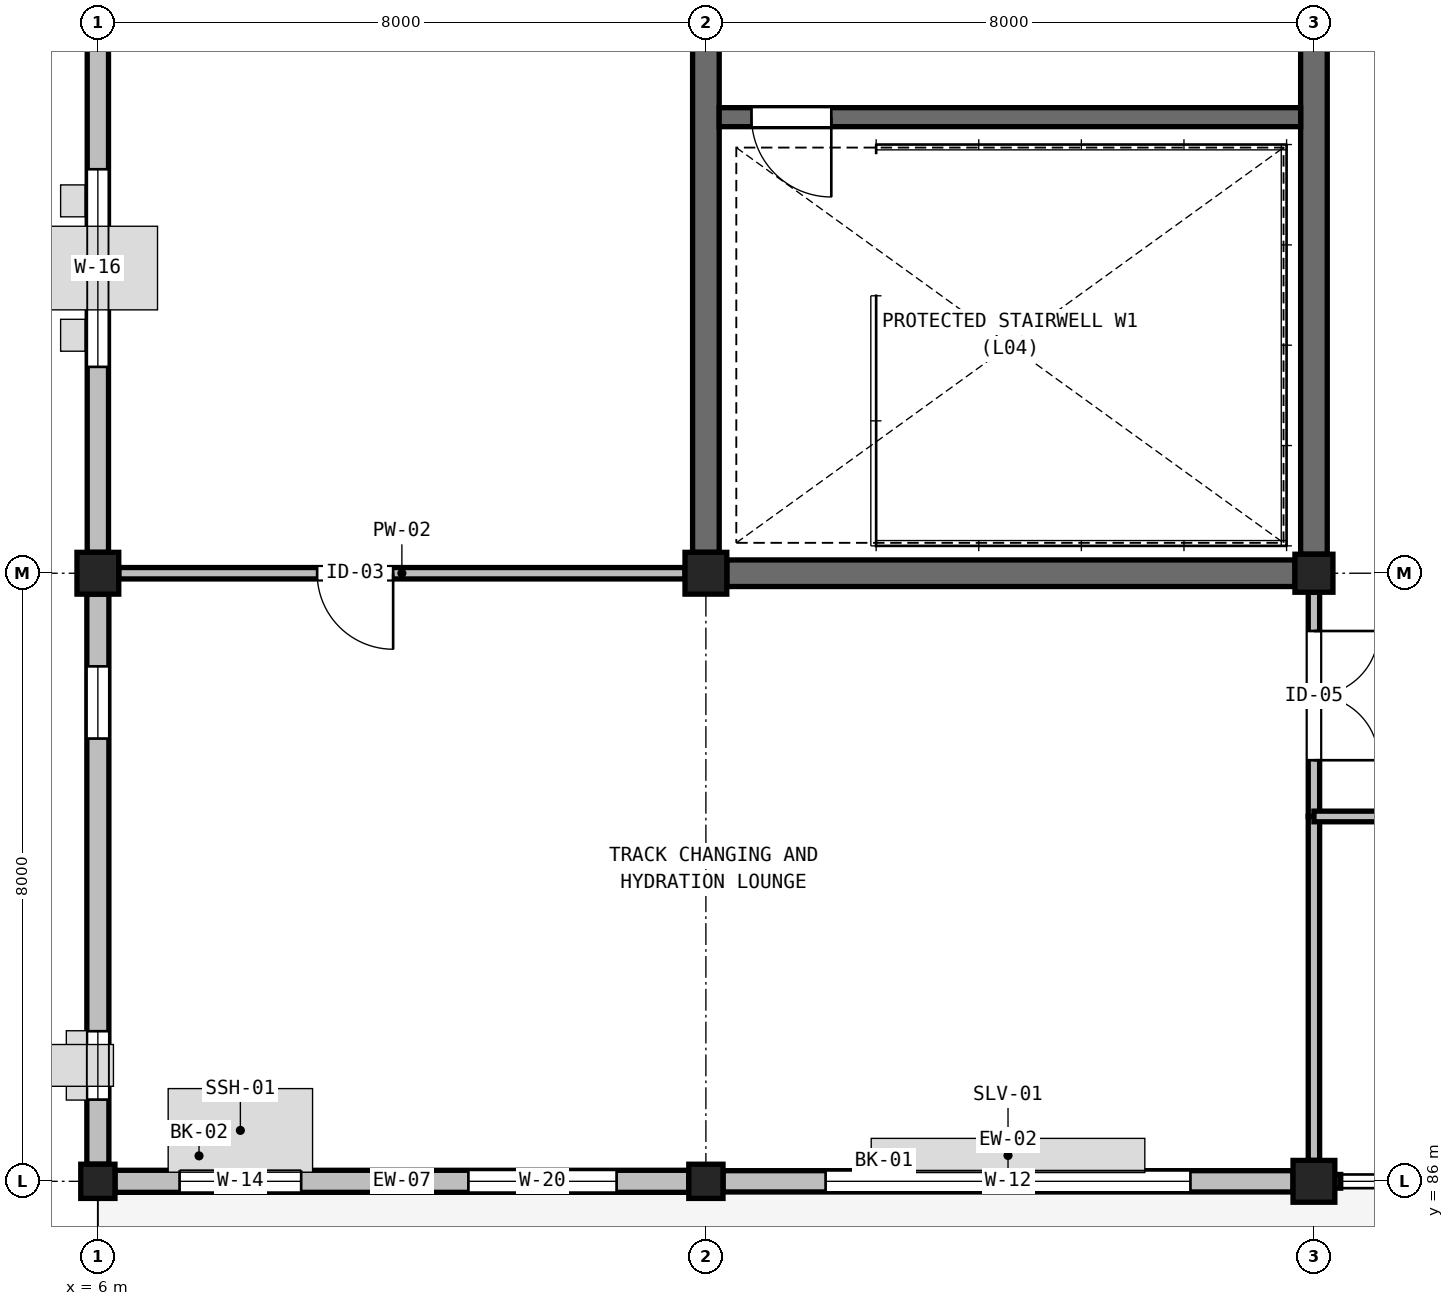
"""IFC4 building model, lengths in metres.
Left out: names, types, materials, properties, quantities, classifications, styles, units other than length and angle.
Written with IfcOpenShell. Run it as: python <this file> out.ifc"""

import sys

from ifc_helpers import new_model, si_unit, direction, frame, frame_2d, origin, origin_2d, place, context, subcontext, project, spatial, rectangle, extrude, element, fill, save


model = new_model("IFC4")
c1 = context("Model", 3, precision=1e-05, world=origin(), true_north=direction((0.0, 1.0)))
c2 = subcontext(c1, "Body", "Model", "MODEL_VIEW")
j1 = project(units=[si_unit("LENGTHUNIT", "METRE"), si_unit("PLANEANGLEUNIT", "RADIAN")], contexts=[c1])
p1 = place(None, origin())
s1 = spatial("IfcSite", under=j1, at=p1, CompositionType="ELEMENT")
p2 = place(p1, origin())
s2 = spatial("IfcBuilding", under=s1, at=p2, CompositionType="ELEMENT")
p3 = place(p2, frame((0.0, 0.0, 19.2)))
s3 = spatial("IfcBuildingStorey", under=s2, at=p3, CompositionType="ELEMENT", Elevation=19.2)
p4 = place(p3, frame((6.0, 86.0, 0.0), z_axis=(0.0, 0.0, 1.0), x_axis=(1.0, 0.0, 0.0)))
e1 = element("IfcColumn", 1, at=p4, inside=s3, PredefinedType="COLUMN", context=c2, shape_type="SweptSolid", body=[
    extrude(rectangle(XDim=0.45, YDim=0.45, at=origin_2d()), origin(), (0.0, 0.0, 1.0), 4.2),
])
p5 = place(p3, frame((6.0, 94.0, 0.0), z_axis=(0.0, 0.0, 1.0), x_axis=(1.0, 0.0, 0.0)))
e2 = element("IfcColumn", 2, at=p5, inside=s3, PredefinedType="COLUMN", context=c2, shape_type="SweptSolid", body=[
    extrude(rectangle(XDim=0.55, YDim=0.55, at=origin_2d()), origin(), (0.0, 0.0, 1.0), 4.2),
])
p6 = place(p3, frame((14.0, 86.0, 0.0), z_axis=(0.0, 0.0, 1.0), x_axis=(1.0, 0.0, 0.0)))
e3 = element("IfcColumn", 3, at=p6, inside=s3, PredefinedType="COLUMN", context=c2, shape_type="SweptSolid", body=[
    extrude(rectangle(XDim=0.45, YDim=0.45, at=origin_2d()), origin(), (0.0, 0.0, 1.0), 4.2),
])
for number, where, z_axis, x_axis in (
    (4, (14.0, 94.0, 0.0), (0.0, 0.0, 1.0), (1.0, 0.0, 0.0)),
    (5, (22.0, 86.0, 0.0), (0.0, 0.0, 1.0), (1.0, 0.0, 0.0)),
):
    element("IfcColumn", number, at=place(p3, frame(where, z_axis=z_axis, x_axis=x_axis)), inside=s3, PredefinedType="COLUMN", context=c2, shape_type="SweptSolid", body=[
        extrude(rectangle(XDim=0.55, YDim=0.55, at=origin_2d()), origin(), (0.0, 0.0, 1.0), 4.2),
    ])
p7 = place(p3, frame((22.0, 94.0, 0.0), z_axis=(0.0, 0.0, 1.0), x_axis=(1.0, 0.0, 0.0)))
e6 = element("IfcColumn", 6, at=p7, inside=s3, PredefinedType="COLUMN", context=c2, shape_type="SweptSolid", body=[
    extrude(rectangle(XDim=0.5, YDim=0.5, at=origin_2d()), origin(), (0.0, 0.0, 1.0), 4.2),
])
p8 = place(p3, frame((6.225, 86.0, 0.0), z_axis=(0.0, 0.0, 1.0), x_axis=(1.0, 0.0, 0.0)))
e7 = element("IfcWall", 7, at=p8, inside=s3, PredefinedType="SOLIDWALL", context=c2, shape_type="SweptSolid", body=[
    extrude(rectangle(XDim=7.55, YDim=0.29, at=frame_2d((3.775, 0.0))), origin(), (0.0, 0.0, 1.0), 3.22),
])
p9 = place(p8, frame((0.85, 0.0, 0.55)))
e8 = element("IfcOpeningElement", 8, at=p9, cuts=e7, PredefinedType="OPENING", context=c2, shape_type="SweptSolid", body=[
    extrude(rectangle(XDim=1.6, YDim=2.0, at=frame_2d((0.8, 1.0))), frame((0.0, 0.155, 0.0), z_axis=(0.0, -1.0, 0.0), x_axis=(1.0, 0.0, 0.0)), (0.0, 0.0, 1.0), 0.31),
])
p10 = place(p8, frame((4.65, 0.0, 0.7)))
e9 = element("IfcOpeningElement", 9, at=p10, cuts=e7, PredefinedType="OPENING", context=c2, shape_type="SweptSolid", body=[
    extrude(rectangle(XDim=1.95, YDim=1.85, at=frame_2d((0.975, 0.925))), frame((0.0, 0.155, 0.0), z_axis=(0.0, -1.0, 0.0), x_axis=(1.0, 0.0, 0.0)), (0.0, 0.0, 1.0), 0.31),
])
p11 = place(p3, frame((14.225, 86.0, 0.0), z_axis=(0.0, 0.0, 1.0), x_axis=(1.0, 0.0, 0.0)))
e10 = element("IfcWall", 10, at=p11, inside=s3, PredefinedType="SOLIDWALL", context=c2, shape_type="SweptSolid", body=[
    extrude(rectangle(XDim=7.5, YDim=0.28, at=frame_2d((3.75, 0.0))), origin(), (0.0, 0.0, 1.0), 3.07),
])
p12 = place(p11, frame((1.35, 0.0, 1.15)))
e11 = element("IfcOpeningElement", 11, at=p12, cuts=e10, PredefinedType="OPENING", context=c2, shape_type="SweptSolid", body=[
    extrude(rectangle(XDim=4.8, YDim=1.4, at=frame_2d((2.4, 0.7))), frame((0.0, 0.15, 0.0), z_axis=(0.0, -1.0, 0.0), x_axis=(1.0, 0.0, 0.0)), (0.0, 0.0, 1.0), 0.3),
])
p13 = place(p3, frame((6.0, 86.225, 0.0), z_axis=(0.0, 0.0, 1.0), x_axis=(0.0, 1.0, 0.0)))
e12 = element("IfcWall", 12, at=p13, inside=s3, PredefinedType="SOLIDWALL", context=c2, shape_type="SweptSolid", body=[
    extrude(rectangle(XDim=7.5, YDim=0.29, at=frame_2d((3.75, 0.0))), origin(), (0.0, 0.0, 1.0), 3.22),
])
p14 = place(p13, frame((0.85, 0.0, 1.35)))
e13 = element("IfcOpeningElement", 13, at=p14, cuts=e12, PredefinedType="OPENING", context=c2, shape_type="SweptSolid", body=[
    extrude(rectangle(XDim=0.9, YDim=1.2, at=frame_2d((0.45, 0.6))), frame((0.0, 0.155, 0.0), z_axis=(0.0, -1.0, 0.0), x_axis=(1.0, 0.0, 0.0)), (0.0, 0.0, 1.0), 0.31),
])
p15 = place(p13, frame((5.6, 0.0, 0.9)))
e14 = element("IfcOpeningElement", 14, at=p15, cuts=e12, PredefinedType="OPENING", context=c2, shape_type="SweptSolid", body=[
    extrude(rectangle(XDim=0.95, YDim=1.65, at=frame_2d((0.475, 0.825))), frame((0.0, 0.155, 0.0), z_axis=(0.0, -1.0, 0.0), x_axis=(1.0, 0.0, 0.0)), (0.0, 0.0, 1.0), 0.31),
])
p16 = place(p3, frame((6.0, 94.275, 0.0), z_axis=(0.0, 0.0, 1.0), x_axis=(0.0, 1.0, 0.0)))
e15 = element("IfcWall", 15, at=p16, inside=s3, PredefinedType="SOLIDWALL", context=c2, shape_type="SweptSolid", body=[
    extrude(rectangle(XDim=7.475, YDim=0.28, at=frame_2d((3.738, 0.0))), origin(), (0.0, 0.0, 1.0), 3.07),
])
p17 = place(p16, frame((2.44, 0.0, 1.45)))
e16 = element("IfcOpeningElement", 16, at=p17, cuts=e15, PredefinedType="OPENING", context=c2, shape_type="SweptSolid", body=[
    extrude(rectangle(XDim=2.6, YDim=1.1, at=frame_2d((1.3, 0.55))), frame((0.0, 0.15, 0.0), z_axis=(0.0, -1.0, 0.0), x_axis=(1.0, 0.0, 0.0)), (0.0, 0.0, 1.0), 0.3),
])
for number, where, z_axis, x_axis in (
    (17, (14.275, 94.0, 0.0), (0.0, 0.0, 1.0), (1.0, 0.0, 0.0)),
    (18, (14.0, 94.275, 0.0), (0.0, 0.0, 1.0), (0.0, 1.0, 0.0)),
):
    element("IfcWall", number, at=place(p3, frame(where, z_axis=z_axis, x_axis=x_axis)), inside=s3, PredefinedType="SHEAR", context=c2, shape_type="SweptSolid", body=[
        extrude(rectangle(XDim=7.475, YDim=0.35, at=frame_2d((3.738, 0.0))), origin(), (0.0, 0.0, 1.0), 3.98),
    ])
p18 = place(p3, frame((22.0, 94.25, 0.0), z_axis=(0.0, 0.0, 1.0), x_axis=(0.0, 1.0, 0.0)))
e19 = element("IfcWall", 19, at=p18, inside=s3, PredefinedType="SHEAR", context=c2, shape_type="SweptSolid", body=[
    extrude(rectangle(XDim=7.525, YDim=0.35, at=frame_2d((3.762, 0.0))), origin(), (0.0, 0.0, 1.0), 3.98),
])
p19 = place(p3, frame((14.175, 100.0, 0.0), z_axis=(0.0, 0.0, 1.0), x_axis=(1.0, 0.0, 0.0)))
e20 = element("IfcWall", 20, at=p19, inside=s3, PredefinedType="SOLIDWALL", context=c2, shape_type="SweptSolid", body=[
    extrude(rectangle(XDim=7.65, YDim=0.25, at=frame_2d((3.825, 0.0))), origin(), (0.0, 0.0, 1.0), 3.98),
])
p20 = place(p19, frame((0.425, 0.0, 0.0)))
e21 = element("IfcOpeningElement", 21, at=p20, cuts=e20, PredefinedType="OPENING", context=c2, shape_type="SweptSolid", body=[
    extrude(rectangle(XDim=1.05, YDim=2.2, at=frame_2d((0.525, 1.1))), frame((0.0, 0.135, 0.0), z_axis=(0.0, -1.0, 0.0), x_axis=(1.0, 0.0, 0.0)), (0.0, 0.0, 1.0), 0.27),
])
p21 = place(p3, frame((6.275, 94.0, 0.0), z_axis=(0.0, 0.0, 1.0), x_axis=(1.0, 0.0, 0.0)))
e22 = element("IfcWall", 22, at=p21, inside=s3, PredefinedType="PARTITIONING", context=c2, shape_type="SweptSolid", body=[
    extrude(rectangle(XDim=7.45, YDim=0.15, at=frame_2d((3.725, 0.0))), origin(), (0.0, 0.0, 1.0), 3.27),
])
p22 = place(p21, frame((2.61, 0.0, 0.0)))
e23 = element("IfcOpeningElement", 23, at=p22, cuts=e22, PredefinedType="OPENING", context=c2, shape_type="SweptSolid", body=[
    extrude(rectangle(XDim=1.0, YDim=2.15, at=frame_2d((0.5, 1.075))), frame((0.0, 0.085, 0.0), z_axis=(0.0, -1.0, 0.0), x_axis=(1.0, 0.0, 0.0)), (0.0, 0.0, 1.0), 0.17),
])
p23 = place(p3, frame((22.0, 86.275, 0.0), z_axis=(0.0, 0.0, 1.0), x_axis=(0.0, 1.0, 0.0)))
e24 = element("IfcWall", 24, at=p23, inside=s3, PredefinedType="PARTITIONING", context=c2, shape_type="SweptSolid", body=[
    extrude(rectangle(XDim=4.525, YDim=0.15, at=frame_2d((2.263, 0.0))), origin(), (0.0, 0.0, 1.0), 3.07),
])
p24 = place(p3, frame((22.0, 90.8, 0.0), z_axis=(0.0, 0.0, 1.0), x_axis=(0.0, 1.0, 0.0)))
e25 = element("IfcWall", 25, at=p24, inside=s3, PredefinedType="PARTITIONING", context=c2, shape_type="SweptSolid", body=[
    extrude(rectangle(XDim=2.95, YDim=0.15, at=frame_2d((1.475, 0.0))), origin(), (0.0, 0.0, 1.0), 3.07),
])
p25 = place(p24, frame((0.74, 0.0, 0.0)))
e26 = element("IfcOpeningElement", 26, at=p25, cuts=e25, PredefinedType="OPENING", context=c2, shape_type="SweptSolid", body=[
    extrude(rectangle(XDim=1.7, YDim=2.25, at=frame_2d((0.85, 1.125))), frame((0.0, 0.085, 0.0), z_axis=(0.0, -1.0, 0.0), x_axis=(1.0, 0.0, 0.0)), (0.0, 0.0, 1.0), 0.17),
])
p26 = place(p3, frame((22.0, 90.8, 0.0), z_axis=(0.0, 0.0, 1.0), x_axis=(1.0, 0.0, 0.0)))
e27 = element("IfcWall", 27, at=p26, inside=s3, PredefinedType="PARTITIONING", context=c2, shape_type="SweptSolid", body=[
    extrude(rectangle(XDim=16.0, YDim=0.14, at=frame_2d((8.0, 0.0))), origin(), (0.0, 0.0, 1.0), 3.9),
])
p27 = place(p26, frame((5.6, 0.0, 0.0)))
e28 = element("IfcOpeningElement", 28, at=p27, cuts=e27, PredefinedType="OPENING", context=c2, shape_type="SweptSolid", body=[
    extrude(rectangle(XDim=0.92, YDim=2.12, at=frame_2d((0.46, 1.06))), frame((0.0, 0.08, 0.0), z_axis=(0.0, -1.0, 0.0), x_axis=(1.0, 0.0, 0.0)), (0.0, 0.0, 1.0), 0.16),
])
p28 = place(p9, origin())
e29 = element("IfcWindow", 29, at=p28, inside=s3, PartitioningType="SINGLE_PANEL", PredefinedType="WINDOW", context=c2, shape_type="SweptSolid", body=[
    extrude(rectangle(XDim=1.6, YDim=2.0, at=frame_2d((0.8, 1.0))), frame((0.0, 0.03, 0.0), z_axis=(0.0, -1.0, 0.0), x_axis=(1.0, 0.0, 0.0)), (0.0, 0.0, 1.0), 0.06),
])
fill(e8, e29)
p29 = place(p10, origin())
e30 = element("IfcWindow", 30, at=p29, inside=s3, PartitioningType="SINGLE_PANEL", PredefinedType="WINDOW", context=c2, shape_type="SweptSolid", body=[
    extrude(rectangle(XDim=1.95, YDim=1.85, at=frame_2d((0.975, 0.925))), frame((0.0, 0.03, 0.0), z_axis=(0.0, -1.0, 0.0), x_axis=(1.0, 0.0, 0.0)), (0.0, 0.0, 1.0), 0.06),
])
fill(e9, e30)
p30 = place(p12, origin())
e31 = element("IfcWindow", 31, at=p30, inside=s3, PartitioningType="SINGLE_PANEL", PredefinedType="WINDOW", context=c2, shape_type="SweptSolid", body=[
    extrude(rectangle(XDim=4.8, YDim=1.4, at=frame_2d((2.4, 0.7))), frame((0.0, 0.03, 0.0), z_axis=(0.0, -1.0, 0.0), x_axis=(1.0, 0.0, 0.0)), (0.0, 0.0, 1.0), 0.06),
])
fill(e11, e31)
p31 = place(p14, origin())
e32 = element("IfcWindow", 32, at=p31, inside=s3, PartitioningType="SINGLE_PANEL", PredefinedType="WINDOW", context=c2, shape_type="SweptSolid", body=[
    extrude(rectangle(XDim=0.9, YDim=1.2, at=frame_2d((0.45, 0.6))), frame((0.0, 0.03, 0.0), z_axis=(0.0, -1.0, 0.0), x_axis=(1.0, 0.0, 0.0)), (0.0, 0.0, 1.0), 0.06),
])
fill(e13, e32)
p32 = place(p15, origin())
e33 = element("IfcWindow", 33, at=p32, inside=s3, PartitioningType="SINGLE_PANEL", PredefinedType="WINDOW", context=c2, shape_type="SweptSolid", body=[
    extrude(rectangle(XDim=0.95, YDim=1.65, at=frame_2d((0.475, 0.825))), frame((0.0, 0.03, 0.0), z_axis=(0.0, -1.0, 0.0), x_axis=(1.0, 0.0, 0.0)), (0.0, 0.0, 1.0), 0.06),
])
fill(e14, e33)
p33 = place(p17, origin())
e34 = element("IfcWindow", 34, at=p33, inside=s3, PartitioningType="SINGLE_PANEL", PredefinedType="WINDOW", context=c2, shape_type="SweptSolid", body=[
    extrude(rectangle(XDim=2.6, YDim=1.1, at=frame_2d((1.3, 0.55))), frame((0.0, 0.03, 0.0), z_axis=(0.0, -1.0, 0.0), x_axis=(1.0, 0.0, 0.0)), (0.0, 0.0, 1.0), 0.06),
])
fill(e16, e34)
p34 = place(p20, frame((1.05, 0.0, 0.0), z_axis=(0.0, 0.0, 1.0), x_axis=(-1.0, 0.0, 0.0)))
e35 = element("IfcDoor", 35, at=p34, inside=s3, OperationType="SINGLE_SWING_RIGHT", PredefinedType="DOOR", context=c2, shape_type="SweptSolid", body=[
    extrude(rectangle(XDim=1.05, YDim=2.2, at=frame_2d((0.525, 1.1))), frame((0.0, 0.025, 0.0), z_axis=(0.0, -1.0, 0.0), x_axis=(1.0, 0.0, 0.0)), (0.0, 0.0, 1.0), 0.05),
])
fill(e21, e35)
p35 = place(p22, frame((1.0, 0.0, 0.0), z_axis=(0.0, 0.0, 1.0), x_axis=(-1.0, 0.0, 0.0)))
e36 = element("IfcDoor", 36, at=p35, inside=s3, OperationType="SINGLE_SWING_RIGHT", PredefinedType="DOOR", context=c2, shape_type="SweptSolid", body=[
    extrude(rectangle(XDim=1.0, YDim=2.15, at=frame_2d((0.5, 1.075))), frame((0.0, 0.025, 0.0), z_axis=(0.0, -1.0, 0.0), x_axis=(1.0, 0.0, 0.0)), (0.0, 0.0, 1.0), 0.05),
])
fill(e23, e36)
p36 = place(p25, frame((1.7, 0.0, 0.0), z_axis=(0.0, 0.0, 1.0), x_axis=(-1.0, 0.0, 0.0)))
e37 = element("IfcDoor", 37, at=p36, inside=s3, OperationType="DOUBLE_DOOR_SINGLE_SWING", PredefinedType="DOOR", context=c2, shape_type="SweptSolid", body=[
    extrude(rectangle(XDim=1.7, YDim=2.25, at=frame_2d((0.85, 1.125))), frame((0.0, 0.025, 0.0), z_axis=(0.0, -1.0, 0.0), x_axis=(1.0, 0.0, 0.0)), (0.0, 0.0, 1.0), 0.05),
])
fill(e26, e37)
save(model, sys.argv[1])
